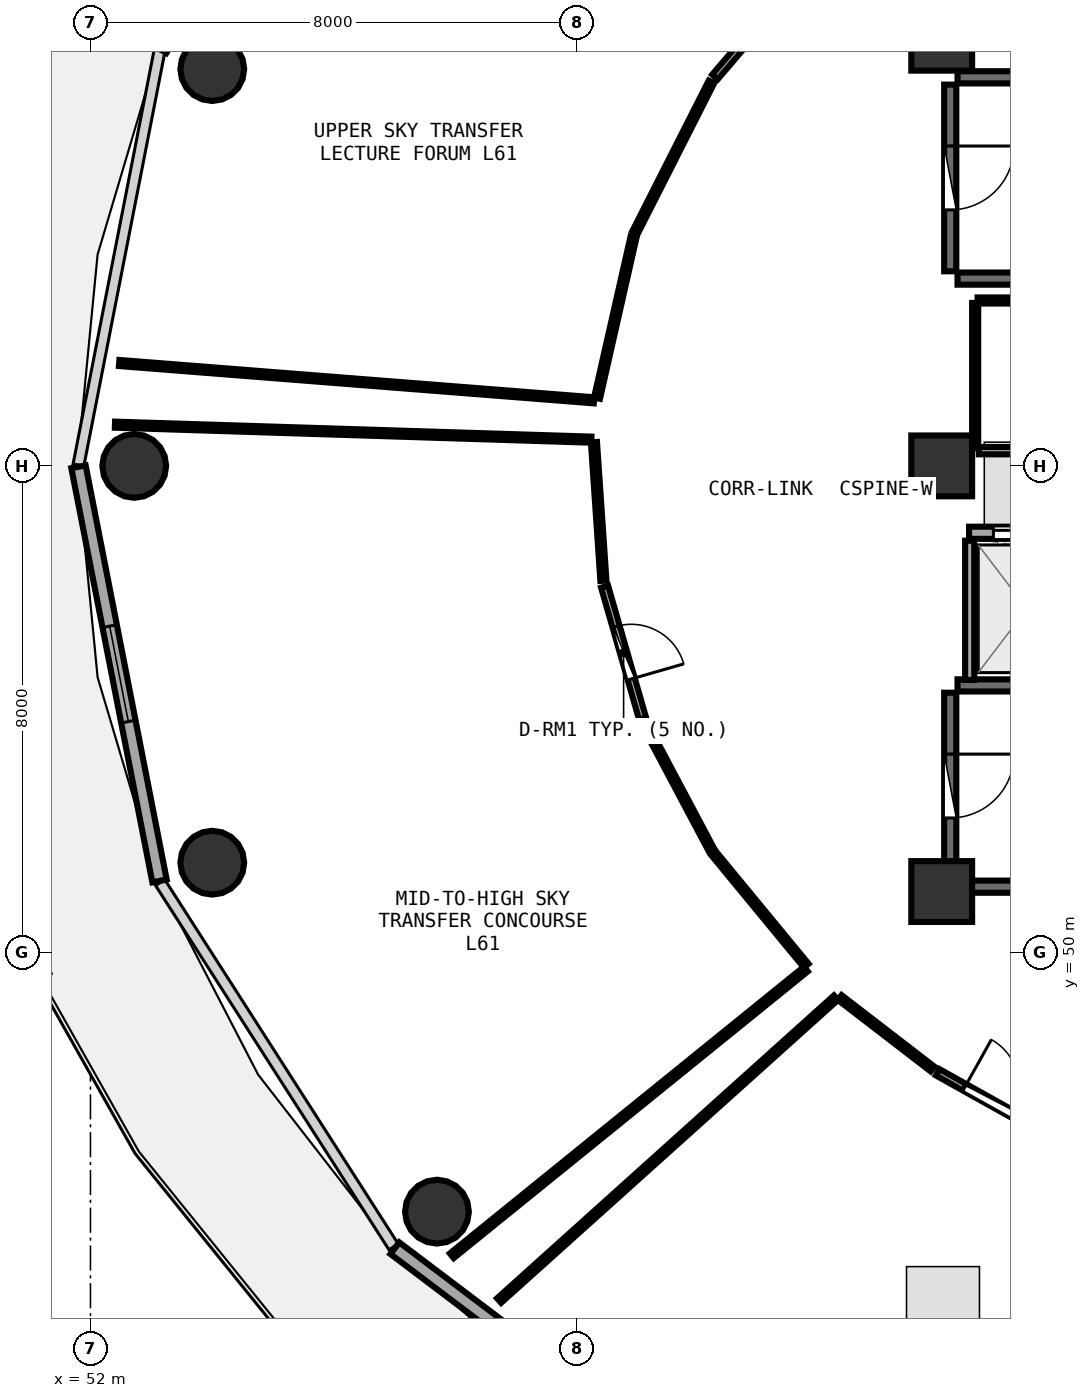
"""IFC4 building model, lengths in metres.
Left out: names, types, materials, properties, quantities, classifications, styles, units other than length and angle.
Written with IfcOpenShell. Run it as: python <this file> out.ifc"""

import sys

from ifc_helpers import new_model, si_unit, direction, frame, frame_2d, origin, origin_2d, place, context, subcontext, project, spatial, rectangle, circle, extrude, element, fill, save


model = new_model("IFC4")
c1 = context("Model", 3, precision=1e-05, world=origin(), true_north=direction((0.0, 1.0)))
c2 = subcontext(c1, "Body", "Model", "MODEL_VIEW")
j1 = project(units=[si_unit("LENGTHUNIT", "METRE"), si_unit("PLANEANGLEUNIT", "RADIAN")], contexts=[c1])
p1 = place(None, origin())
s1 = spatial("IfcSite", under=j1, at=p1, CompositionType="ELEMENT")
p2 = place(p1, origin())
s2 = spatial("IfcBuilding", under=s1, at=p2, CompositionType="ELEMENT")
p3 = place(p2, frame((0.0, 0.0, 238.2)))
s3 = spatial("IfcBuildingStorey", under=s2, at=p3, CompositionType="ELEMENT", Elevation=238.2)
for number, where, z_axis, x_axis in (
    (1, (66.0, 51.0, 0.0), (0.0, 0.0, 1.0), (1.0, 0.0, 0.0)),
    (2, (66.0, 65.0, 0.0), (0.0, 0.0, 1.0), (1.0, 0.0, 0.0)),
    (3, (66.0, 58.0, 0.0), (0.0, 0.0, 1.0), (1.0, 0.0, 0.0)),
):
    element("IfcColumn", number, at=place(p3, frame(where, z_axis=z_axis, x_axis=x_axis)), inside=s3, PredefinedType="PILASTER", context=c2, shape_type="SweptSolid", body=[
        extrude(rectangle(XDim=1.0, YDim=1.0, at=origin_2d()), origin(), (0.0, 0.0, 1.0), 4.76),
    ])
for number, where, z_axis, x_axis in (
    (4, (54.003, 64.526, 0.0), (0.0, 0.0, 1.0), (1.0, 0.0, 0.0)),
    (5, (52.72, 58.0, 0.0), (0.0, 0.0, 1.0), (1.0, 0.0, 0.0)),
    (6, (54.003, 51.474, 0.0), (0.0, 0.0, 1.0), (1.0, 0.0, 0.0)),
    (7, (57.698, 45.736, 0.0), (0.0, 0.0, 1.0), (1.0, 0.0, 0.0)),
):
    element("IfcColumn", number, at=place(p3, frame(where, z_axis=z_axis, x_axis=x_axis)), inside=s3, PredefinedType="COLUMN", context=c2, shape_type="SweptSolid", body=[
        extrude(circle(Radius=0.525, at=origin_2d()), origin(), (0.0, 0.0, 1.0), 4.76),
    ])
p4 = place(p3, frame((56.986, 70.843, 0.0), z_axis=(0.0, 0.0, 1.0), x_axis=(-0.539539512973, -0.841960280501, 0.0)))
e8 = element("IfcWall", 8, at=p4, inside=s3, PredefinedType="SOLIDWALL", context=c2, shape_type="SweptSolid", body=[
    extrude(rectangle(XDim=7.115, YDim=0.24, at=frame_2d((3.557, 0.0))), origin(), (0.0, 0.0, 1.0), 4.345),
])
p5 = place(p4, frame((3.082, 0.0, 0.0)))
e9 = element("IfcOpeningElement", 9, at=p5, cuts=e8, PredefinedType="OPENING", context=c2, shape_type="SweptSolid", body=[
    extrude(rectangle(XDim=0.95, YDim=2.1, at=frame_2d((0.475, 1.05))), frame((0.0, 0.13, 0.0), z_axis=(0.0, -1.0, 0.0), x_axis=(1.0, 0.0, 0.0)), (0.0, 0.0, 1.0), 0.26),
])
p6 = place(p4, frame((4.382, 0.0, 0.85)))
e10 = element("IfcOpeningElement", 10, at=p6, cuts=e8, PredefinedType="OPENING", context=c2, shape_type="SweptSolid", body=[
    extrude(rectangle(XDim=1.2, YDim=1.45, at=frame_2d((0.6, 0.725))), frame((0.0, 0.13, 0.0), z_axis=(0.0, -1.0, 0.0), x_axis=(1.0, 0.0, 0.0)), (0.0, 0.0, 1.0), 0.26),
])
p7 = place(p3, frame((51.803, 57.985, 0.0), z_axis=(0.0, 0.0, 1.0), x_axis=(0.192069055673, -0.981381413036, 0.0)))
e11 = element("IfcWall", 11, at=p7, inside=s3, PredefinedType="SOLIDWALL", context=c2, shape_type="SweptSolid", body=[
    extrude(rectangle(XDim=6.94, YDim=0.24, at=frame_2d((3.47, 0.0))), origin(), (0.0, 0.0, 1.0), 4.345),
])
p8 = place(p7, frame((2.67, 0.0, 0.85)))
e12 = element("IfcOpeningElement", 12, at=p8, cuts=e11, PredefinedType="OPENING", context=c2, shape_type="SweptSolid", body=[
    extrude(rectangle(XDim=1.6, YDim=1.45, at=frame_2d((0.8, 0.725))), frame((0.0, 0.13, 0.0), z_axis=(0.0, -1.0, 0.0), x_axis=(1.0, 0.0, 0.0)), (0.0, 0.0, 1.0), 0.26),
])
p9 = place(p3, frame((57.006, 45.135, 0.0), z_axis=(0.0, 0.0, 1.0), x_axis=(0.797701674595, -0.603052268338, 0.0)))
e13 = element("IfcWall", 13, at=p9, inside=s3, PredefinedType="SOLIDWALL", context=c2, shape_type="SweptSolid", body=[
    extrude(rectangle(XDim=7.374, YDim=0.24, at=frame_2d((3.687, 0.0))), origin(), (0.0, 0.0, 1.0), 4.345),
])
p10 = place(p9, frame((2.887, 0.0, 0.85)))
e14 = element("IfcOpeningElement", 14, at=p10, cuts=e13, PredefinedType="OPENING", context=c2, shape_type="SweptSolid", body=[
    extrude(rectangle(XDim=1.6, YDim=1.45, at=frame_2d((0.8, 0.725))), frame((0.0, 0.13, 0.0), z_axis=(0.0, -1.0, 0.0), x_axis=(1.0, 0.0, 0.0)), (0.0, 0.0, 1.0), 0.26),
])
for number, where, z_axis, x_axis in (
    (15, (66.26, 61.08, 0.0), (0.0, 0.0, 1.0), (1.0, 0.0, 0.0)),
    (16, (73.42, 64.39, 0.0), (0.0, 0.0, 1.0), (-1.0, 0.0, 0.0)),
):
    element("IfcWall", number, at=place(p3, frame(where, z_axis=z_axis, x_axis=x_axis)), inside=s3, PredefinedType="SHEAR", context=c2, shape_type="SweptSolid", body=[
        extrude(rectangle(XDim=7.16, YDim=0.2, at=frame_2d((3.58, 0.0))), origin(), (0.0, 0.0, 1.0), 4.36),
    ])
p11 = place(p3, frame((66.14, 64.27, 0.0), z_axis=(0.0, 0.0, 1.0), x_axis=(0.0, -1.0, 0.0)))
e17 = element("IfcWall", 17, at=p11, inside=s3, PredefinedType="SHEAR", context=c2, shape_type="SweptSolid", body=[
    extrude(rectangle(XDim=3.07, YDim=0.2, at=frame_2d((1.535, 0.0))), origin(), (0.0, 0.0, 1.0), 4.36),
])
p12 = place(p11, frame((1.01, 0.0, 0.0)))
e18 = element("IfcOpeningElement", 18, at=p12, cuts=e17, PredefinedType="OPENING", context=c2, shape_type="SweptSolid", body=[
    extrude(rectangle(XDim=1.05, YDim=2.1, at=frame_2d((0.525, 1.05))), frame((0.0, 0.11, 0.0), z_axis=(0.0, -1.0, 0.0), x_axis=(1.0, 0.0, 0.0)), (0.0, 0.0, 1.0), 0.22),
])
for number, where, z_axis, x_axis in (
    (19, (66.26, 51.08, 0.0), (0.0, 0.0, 1.0), (1.0, 0.0, 0.0)),
    (20, (73.42, 54.39, 0.0), (0.0, 0.0, 1.0), (-1.0, 0.0, 0.0)),
):
    element("IfcWall", number, at=place(p3, frame(where, z_axis=z_axis, x_axis=x_axis)), inside=s3, PredefinedType="SHEAR", context=c2, shape_type="SweptSolid", body=[
        extrude(rectangle(XDim=7.16, YDim=0.2, at=frame_2d((3.58, 0.0))), origin(), (0.0, 0.0, 1.0), 4.36),
    ])
p13 = place(p3, frame((66.14, 54.27, 0.0), z_axis=(0.0, 0.0, 1.0), x_axis=(0.0, -1.0, 0.0)))
e21 = element("IfcWall", 21, at=p13, inside=s3, PredefinedType="SHEAR", context=c2, shape_type="SweptSolid", body=[
    extrude(rectangle(XDim=3.07, YDim=0.2, at=frame_2d((1.535, 0.0))), origin(), (0.0, 0.0, 1.0), 4.36),
])
p14 = place(p13, frame((1.01, 0.0, 0.0)))
e22 = element("IfcOpeningElement", 22, at=p14, cuts=e21, PredefinedType="OPENING", context=c2, shape_type="SweptSolid", body=[
    extrude(rectangle(XDim=1.05, YDim=2.1, at=frame_2d((0.525, 1.05))), frame((0.0, 0.11, 0.0), z_axis=(0.0, -1.0, 0.0), x_axis=(1.0, 0.0, 0.0)), (0.0, 0.0, 1.0), 0.22),
])
p15 = place(p3, frame((66.45, 56.9, 0.0), z_axis=(0.0, 0.0, 1.0), x_axis=(1.0, 0.0, 0.0)))
e23 = element("IfcWall", 23, at=p15, inside=s3, PredefinedType="SOLIDWALL", context=c2, shape_type="SweptSolid", body=[
    extrude(rectangle(XDim=14.4, YDim=0.2, at=frame_2d((7.2, 0.0))), origin(), (0.0, 0.0, 1.0), 4.35),
])
p16 = place(p15, frame((0.4, 0.0, 0.0)))
e24 = element("IfcOpeningElement", 24, at=p16, cuts=e23, PredefinedType="OPENING", context=c2, shape_type="SweptSolid", body=[
    extrude(rectangle(XDim=1.1, YDim=2.1, at=frame_2d((0.55, 1.05))), frame((0.0, 0.11, 0.0), z_axis=(0.0, -1.0, 0.0), x_axis=(1.0, 0.0, 0.0)), (0.0, 0.0, 1.0), 0.22),
])
p17 = place(p15, frame((2.4, 0.0, 0.0)))
e25 = element("IfcOpeningElement", 25, at=p17, cuts=e23, PredefinedType="OPENING", context=c2, shape_type="SweptSolid", body=[
    extrude(rectangle(XDim=1.1, YDim=2.1, at=frame_2d((0.55, 1.05))), frame((0.0, 0.11, 0.0), z_axis=(0.0, -1.0, 0.0), x_axis=(1.0, 0.0, 0.0)), (0.0, 0.0, 1.0), 0.22),
])
p18 = place(p15, frame((4.4, 0.0, 0.0)))
e26 = element("IfcOpeningElement", 26, at=p18, cuts=e23, PredefinedType="OPENING", context=c2, shape_type="SweptSolid", body=[
    extrude(rectangle(XDim=1.1, YDim=2.1, at=frame_2d((0.55, 1.05))), frame((0.0, 0.11, 0.0), z_axis=(0.0, -1.0, 0.0), x_axis=(1.0, 0.0, 0.0)), (0.0, 0.0, 1.0), 0.22),
])
p19 = place(p15, frame((6.4, 0.0, 0.0)))
e27 = element("IfcOpeningElement", 27, at=p19, cuts=e23, PredefinedType="OPENING", context=c2, shape_type="SweptSolid", body=[
    extrude(rectangle(XDim=1.1, YDim=2.1, at=frame_2d((0.55, 1.05))), frame((0.0, 0.11, 0.0), z_axis=(0.0, -1.0, 0.0), x_axis=(1.0, 0.0, 0.0)), (0.0, 0.0, 1.0), 0.22),
])
p20 = place(p15, frame((8.4, 0.0, 0.0)))
e28 = element("IfcOpeningElement", 28, at=p20, cuts=e23, PredefinedType="OPENING", context=c2, shape_type="SweptSolid", body=[
    extrude(rectangle(XDim=1.1, YDim=2.1, at=frame_2d((0.55, 1.05))), frame((0.0, 0.11, 0.0), z_axis=(0.0, -1.0, 0.0), x_axis=(1.0, 0.0, 0.0)), (0.0, 0.0, 1.0), 0.22),
])
p21 = place(p3, frame((66.46, 54.48, 0.0), z_axis=(0.0, 0.0, 1.0), x_axis=(0.0, 1.0, 0.0)))
e29 = element("IfcWall", 29, at=p21, inside=s3, PredefinedType="PARTITIONING", context=c2, shape_type="SweptSolid", body=[
    extrude(rectangle(XDim=2.29, YDim=0.15, at=frame_2d((1.145, 0.0))), origin(), (0.0, 0.0, 1.0), 4.35),
])
p22 = place(p3, frame((66.61, 58.25, 0.0), z_axis=(0.0, 0.0, 1.0), x_axis=(1.0, 0.0, 0.0)))
e30 = element("IfcWall", 30, at=p22, inside=s3, PredefinedType="PARTITIONING", context=c2, shape_type="SweptSolid", body=[
    extrude(rectangle(XDim=5.78, YDim=0.12, at=frame_2d((2.89, 0.0))), origin(), (0.0, 0.0, 1.0), 4.35),
])
p23 = place(p22, frame((2.44, 0.0, 0.0)))
e31 = element("IfcOpeningElement", 31, at=p23, cuts=e30, PredefinedType="OPENING", context=c2, shape_type="SweptSolid", body=[
    extrude(rectangle(XDim=0.9, YDim=2.08, at=frame_2d((0.45, 1.04))), frame((0.0, 0.07, 0.0), z_axis=(0.0, -1.0, 0.0), x_axis=(1.0, 0.0, 0.0)), (0.0, 0.0, 1.0), 0.14),
])
p24 = place(p3, frame((64.084, 66.519, 0.0), z_axis=(0.0, 0.0, 1.0), x_axis=(-0.649465845108, -0.760390765356, 0.0)))
e32 = element("IfcWall", 32, at=p24, inside=s3, PredefinedType="PARTITIONING", context=c2, shape_type="SweptSolid", body=[
    extrude(rectangle(XDim=2.793, YDim=0.12, at=frame_2d((1.396, 0.0))), origin(), (0.0, 0.0, 1.0), 2.345),
])
p25 = place(p24, frame((0.947, 0.0, 0.0)))
e33 = element("IfcOpeningElement", 33, at=p25, cuts=e32, PredefinedType="OPENING", context=c2, shape_type="SweptSolid", body=[
    extrude(rectangle(XDim=0.9, YDim=2.08, at=frame_2d((0.45, 1.04))), frame((0.0, 0.07, 0.0), z_axis=(0.0, -1.0, 0.0), x_axis=(1.0, 0.0, 0.0)), (0.0, 0.0, 1.0), 0.14),
])
p26 = place(p3, frame((60.456, 56.013, 0.0), z_axis=(0.0, 0.0, 1.0), x_axis=(0.276788679801, -0.960930812668, 0.0)))
e34 = element("IfcWall", 34, at=p26, inside=s3, PredefinedType="PARTITIONING", context=c2, shape_type="SweptSolid", body=[
    extrude(rectangle(XDim=2.261, YDim=0.12, at=frame_2d((1.13, 0.0))), origin(), (0.0, 0.0, 1.0), 4.35),
])
p27 = place(p26, frame((0.68, 0.0, 0.0)))
e35 = element("IfcOpeningElement", 35, at=p27, cuts=e34, PredefinedType="OPENING", context=c2, shape_type="SweptSolid", body=[
    extrude(rectangle(XDim=0.9, YDim=2.08, at=frame_2d((0.45, 1.04))), frame((0.0, 0.07, 0.0), z_axis=(0.0, -1.0, 0.0), x_axis=(1.0, 0.0, 0.0)), (0.0, 0.0, 1.0), 0.14),
])
p28 = place(p3, frame((65.933, 48.028, 0.0), z_axis=(0.0, 0.0, 1.0), x_axis=(0.873020002145, -0.487684401898, 0.0)))
e36 = element("IfcWall", 36, at=p28, inside=s3, PredefinedType="PARTITIONING", context=c2, shape_type="SweptSolid", body=[
    extrude(rectangle(XDim=1.918, YDim=0.12, at=frame_2d((0.959, 0.0))), origin(), (0.0, 0.0, 1.0), 2.345),
])
p29 = place(p28, frame((0.509, 0.0, 0.0)))
e37 = element("IfcOpeningElement", 37, at=p29, cuts=e36, PredefinedType="OPENING", context=c2, shape_type="SweptSolid", body=[
    extrude(rectangle(XDim=0.9, YDim=2.08, at=frame_2d((0.45, 1.04))), frame((0.0, 0.07, 0.0), z_axis=(0.0, -1.0, 0.0), x_axis=(1.0, 0.0, 0.0)), (0.0, 0.0, 1.0), 0.14),
])
p30 = place(p3, frame((72.41, 60.72, 0.0), z_axis=(0.0, 0.0, 1.0), x_axis=(-1.0, 0.0, 0.0)))
e38 = element("IfcWall", 38, at=p30, inside=s3, PredefinedType="PARTITIONING", context=c2, shape_type="SweptSolid", body=[
    extrude(rectangle(XDim=5.82, YDim=0.1, at=frame_2d((2.91, 0.0))), origin(), (0.0, 0.0, 1.0), 4.35),
])
p31 = place(p3, frame((66.55, 60.68, 0.0), z_axis=(0.0, 0.0, 1.0), x_axis=(0.0, -1.0, 0.0)))
e39 = element("IfcWall", 39, at=p31, inside=s3, PredefinedType="PARTITIONING", context=c2, shape_type="SweptSolid", body=[
    extrude(rectangle(XDim=2.39, YDim=0.1, at=frame_2d((1.195, 0.0))), origin(), (0.0, 0.0, 1.0), 4.35),
])
p32 = place(p3, frame((62.213, 64.314, 0.0), z_axis=(0.0, 0.0, 1.0), x_axis=(-0.452532690557, -0.891747814114, 0.0)))
e40 = element("IfcWall", 40, at=p32, inside=s3, PredefinedType="PARTITIONING", context=c2, shape_type="SweptSolid", body=[
    extrude(rectangle(XDim=2.768, YDim=0.1, at=frame_2d((1.384, 0.0))), origin(), (0.0, 0.0, 1.0), 2.345),
])
p33 = place(p3, frame((60.933, 61.771, 0.0), z_axis=(0.0, 0.0, 1.0), x_axis=(-0.221074940913, -0.975256822842, 0.0)))
e41 = element("IfcWall", 41, at=p33, inside=s3, PredefinedType="PARTITIONING", context=c2, shape_type="SweptSolid", body=[
    extrude(rectangle(XDim=2.724, YDim=0.1, at=frame_2d((1.362, 0.0))), origin(), (0.0, 0.0, 1.0), 4.35),
])
p34 = place(p3, frame((60.282, 59.078, 0.0), z_axis=(0.0, 0.0, 1.0), x_axis=(-0.996926267176, 0.078345502835, 0.0)))
e42 = element("IfcWall", 42, at=p34, inside=s3, PredefinedType="PARTITIONING", context=c2, shape_type="SweptSolid", body=[
    extrude(rectangle(XDim=7.834, YDim=0.1, at=frame_2d((3.917, 0.0))), origin(), (0.0, 0.0, 1.0), 2.345),
])
p35 = place(p3, frame((60.281, 58.39, 0.0), z_axis=(0.0, 0.0, 1.0), x_axis=(0.068072237744, -0.99768039494, 0.0)))
e43 = element("IfcWall", 43, at=p35, inside=s3, PredefinedType="PARTITIONING", context=c2, shape_type="SweptSolid", body=[
    extrude(rectangle(XDim=2.285, YDim=0.1, at=frame_2d((1.142, 0.0))), origin(), (0.0, 0.0, 1.0), 2.345),
])
p36 = place(p3, frame((61.117, 53.748, 0.0), z_axis=(0.0, 0.0, 1.0), x_axis=(0.469073693437, -0.883159028785, 0.0)))
e44 = element("IfcWall", 44, at=p36, inside=s3, PredefinedType="PARTITIONING", context=c2, shape_type="SweptSolid", body=[
    extrude(rectangle(XDim=2.335, YDim=0.1, at=frame_2d((1.168, 0.0))), origin(), (0.0, 0.0, 1.0), 2.345),
])
p37 = place(p3, frame((62.256, 51.619, 0.0), z_axis=(0.0, 0.0, 1.0), x_axis=(0.636052062508, -0.771646145444, 0.0)))
e45 = element("IfcWall", 45, at=p37, inside=s3, PredefinedType="PARTITIONING", context=c2, shape_type="SweptSolid", body=[
    extrude(rectangle(XDim=2.382, YDim=0.1, at=frame_2d((1.191, 0.0))), origin(), (0.0, 0.0, 1.0), 2.345),
])
p38 = place(p3, frame((63.766, 49.725, 0.0), z_axis=(0.0, 0.0, 1.0), x_axis=(-0.777235006442, -0.629210413742, 0.0)))
e46 = element("IfcWall", 46, at=p38, inside=s3, PredefinedType="PARTITIONING", context=c2, shape_type="SweptSolid", body=[
    extrude(rectangle(XDim=7.493, YDim=0.1, at=frame_2d((3.747, 0.0))), origin(), (0.0, 0.0, 1.0), 2.345),
])
p39 = place(p3, frame((52.403, 58.678, 0.0), z_axis=(0.0, 0.0, 1.0), x_axis=(0.999506102382, -0.03142532897, 0.0)))
e47 = element("IfcWall", 47, at=p39, inside=s3, PredefinedType="PARTITIONING", context=c2, shape_type="SweptSolid", body=[
    extrude(rectangle(XDim=7.839, YDim=0.1, at=frame_2d((3.919, 0.0))), origin(), (0.0, 0.0, 1.0), 2.345),
])
p40 = place(p3, frame((64.323, 49.257, 0.0), z_axis=(0.0, 0.0, 1.0), x_axis=(0.792378964909, -0.610029159934, 0.0)))
e48 = element("IfcWall", 48, at=p40, inside=s3, PredefinedType="PARTITIONING", context=c2, shape_type="SweptSolid", body=[
    extrude(rectangle(XDim=1.927, YDim=0.1, at=frame_2d((0.963, 0.0))), origin(), (0.0, 0.0, 1.0), 2.345),
])
p41 = place(p3, frame((58.721, 44.274, 0.0), z_axis=(0.0, 0.0, 1.0), x_axis=(0.743678571083, 0.668537345936, 0.0)))
e49 = element("IfcWall", 49, at=p41, inside=s3, PredefinedType="PARTITIONING", context=c2, shape_type="SweptSolid", body=[
    extrude(rectangle(XDim=7.45, YDim=0.1, at=frame_2d((3.725, 0.0))), origin(), (0.0, 0.0, 1.0), 2.345),
])
p42 = place(p8, origin())
e50 = element("IfcWindow", 50, at=p42, inside=s3, PartitioningType="SINGLE_PANEL", PredefinedType="WINDOW", context=c2, shape_type="SweptSolid", body=[
    extrude(rectangle(XDim=1.6, YDim=1.45, at=frame_2d((0.8, 0.725))), frame((0.0, 0.03, 0.0), z_axis=(0.0, -1.0, 0.0), x_axis=(1.0, 0.0, 0.0)), (0.0, 0.0, 1.0), 0.06),
])
fill(e12, e50)
p43 = place(p12, origin())
e51 = element("IfcDoor", 51, at=p43, inside=s3, OperationType="SINGLE_SWING_LEFT", PredefinedType="DOOR", context=c2, shape_type="SweptSolid", body=[
    extrude(rectangle(XDim=1.05, YDim=2.1, at=frame_2d((0.525, 1.05))), frame((0.0, 0.025, 0.0), z_axis=(0.0, -1.0, 0.0), x_axis=(1.0, 0.0, 0.0)), (0.0, 0.0, 1.0), 0.05),
])
fill(e18, e51)
p44 = place(p14, origin())
e52 = element("IfcDoor", 52, at=p44, inside=s3, OperationType="SINGLE_SWING_LEFT", PredefinedType="DOOR", context=c2, shape_type="SweptSolid", body=[
    extrude(rectangle(XDim=1.05, YDim=2.1, at=frame_2d((0.525, 1.05))), frame((0.0, 0.025, 0.0), z_axis=(0.0, -1.0, 0.0), x_axis=(1.0, 0.0, 0.0)), (0.0, 0.0, 1.0), 0.05),
])
fill(e22, e52)
p45 = place(p16, origin())
e53 = element("IfcDoor", 53, at=p45, inside=s3, OperationType="DOUBLE_DOOR_SLIDING", PredefinedType="DOOR", context=c2, shape_type="SweptSolid", body=[
    extrude(rectangle(XDim=1.1, YDim=2.1, at=frame_2d((0.55, 1.05))), frame((0.0, 0.025, 0.0), z_axis=(0.0, -1.0, 0.0), x_axis=(1.0, 0.0, 0.0)), (0.0, 0.0, 1.0), 0.05),
])
fill(e24, e53)
p46 = place(p27, origin())
e54 = element("IfcDoor", 54, at=p46, inside=s3, OperationType="SINGLE_SWING_RIGHT", PredefinedType="DOOR", context=c2, shape_type="SweptSolid", body=[
    extrude(rectangle(XDim=0.9, YDim=2.08, at=frame_2d((0.45, 1.04))), frame((0.0, 0.025, 0.0), z_axis=(0.0, -1.0, 0.0), x_axis=(1.0, 0.0, 0.0)), (0.0, 0.0, 1.0), 0.05),
])
fill(e35, e54)
p47 = place(p29, origin())
e55 = element("IfcDoor", 55, at=p47, inside=s3, OperationType="SINGLE_SWING_LEFT", PredefinedType="DOOR", context=c2, shape_type="SweptSolid", body=[
    extrude(rectangle(XDim=0.9, YDim=2.08, at=frame_2d((0.45, 1.04))), frame((0.0, 0.025, 0.0), z_axis=(0.0, -1.0, 0.0), x_axis=(1.0, 0.0, 0.0)), (0.0, 0.0, 1.0), 0.05),
])
fill(e37, e55)
save(model, sys.argv[1])
